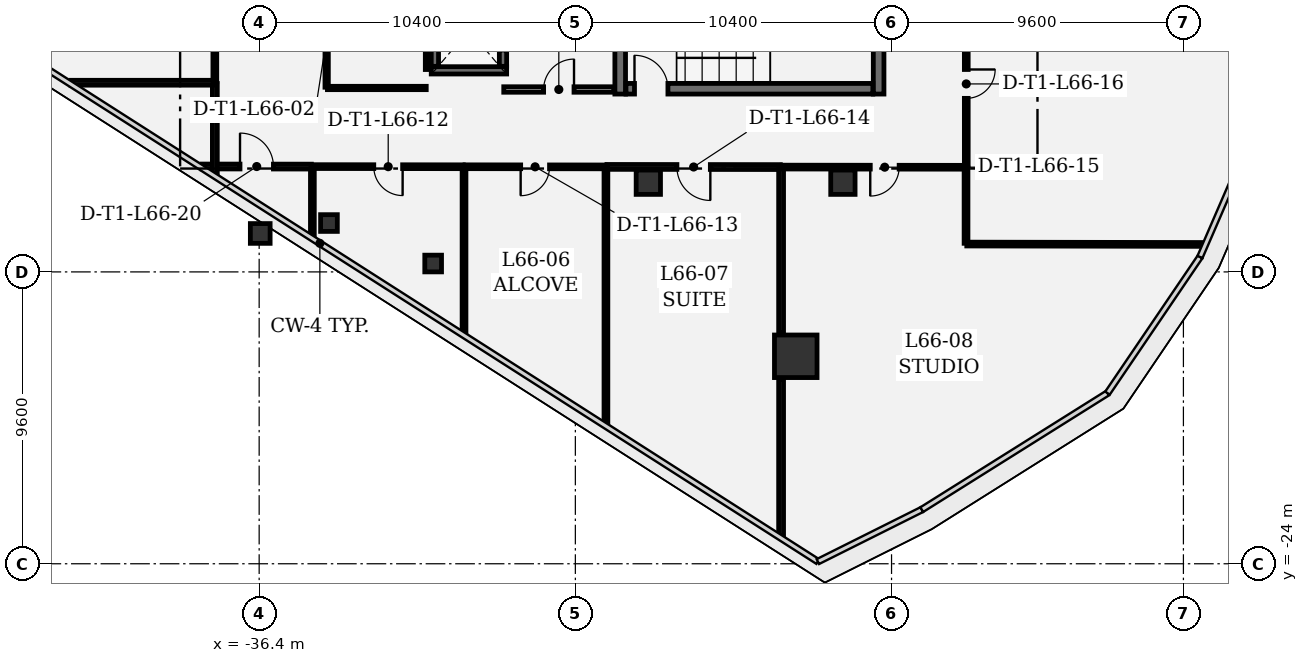
"""IFC4 building model, lengths in metres.
Left out: names, types, materials, properties, quantities, classifications, styles, units other than length and angle.
Written with IfcOpenShell. Run it as: python <this file> out.ifc"""

import sys

from ifc_helpers import new_model, si_unit, direction, frame, frame_2d, origin, origin_2d, place, context, subcontext, project, spatial, rectangle, extrude, element, fill, save


model = new_model("IFC4")
c1 = context("Model", 3, precision=1e-05, world=origin(), true_north=direction((0.0, 1.0)))
c2 = subcontext(c1, "Body", "Model", "MODEL_VIEW")
j1 = project(units=[si_unit("LENGTHUNIT", "METRE"), si_unit("PLANEANGLEUNIT", "RADIAN")], contexts=[c1])
p1 = place(None, origin())
s1 = spatial("IfcSite", under=j1, at=p1, CompositionType="ELEMENT")
p2 = place(p1, origin())
s2 = spatial("IfcBuilding", under=s1, at=p2, CompositionType="ELEMENT")
p3 = place(p2, frame((0.0, 0.0, 285.0)))
s3 = spatial("IfcBuildingStorey", under=s2, at=p3, CompositionType="ELEMENT", Elevation=285.0)
p4 = place(p3, frame((-18.75, -17.176, 0.0), z_axis=(0.0, 0.0, 1.0), x_axis=(1.0, 0.0, 0.0)))
e1 = element("IfcColumn", 1, at=p4, inside=s3, PredefinedType="COLUMN", context=c2, shape_type="SweptSolid", body=[
    extrude(rectangle(XDim=1.4, YDim=1.4, at=origin_2d()), origin(), (0.0, 0.0, 1.0), 4.2),
])
for number, where, z_axis, x_axis in (
    (2, (-17.2, -11.45, 0.0), (0.0, 0.0, 1.0), (1.0, 0.0, 0.0)),
    (3, (-23.6, -11.45, 0.0), (0.0, 0.0, 1.0), (1.0, 0.0, 0.0)),
):
    element("IfcColumn", number, at=place(p3, frame(where, z_axis=z_axis, x_axis=x_axis)), inside=s3, PredefinedType="COLUMN", context=c2, shape_type="SweptSolid", body=[
        extrude(rectangle(XDim=0.8, YDim=0.8, at=origin_2d()), origin(), (0.0, 0.0, 1.0), 4.2),
    ])
p5 = place(p3, frame((-36.365, -13.135, 0.0), z_axis=(0.0, 0.0, 1.0), x_axis=(1.0, 0.0, 0.0)))
e4 = element("IfcColumn", 4, at=p5, inside=s3, PredefinedType="COLUMN", context=c2, shape_type="SweptSolid", body=[
    extrude(rectangle(XDim=0.65, YDim=0.65, at=origin_2d()), origin(), (0.0, 0.0, 1.0), 4.2),
])
for number, where, z_axis, x_axis in (
    (5, (-34.104, -12.792, 0.0), (0.0, 0.0, 1.0), (1.0, 0.0, 0.0)),
    (6, (-30.677, -14.124, 0.0), (0.0, 0.0, 1.0), (1.0, 0.0, 0.0)),
):
    element("IfcColumn", number, at=place(p3, frame(where, z_axis=z_axis, x_axis=x_axis)), inside=s3, PredefinedType="COLUMN", context=c2, shape_type="SweptSolid", body=[
        extrude(rectangle(XDim=0.55, YDim=0.55, at=origin_2d()), origin(), (0.0, 0.0, 1.0), 4.2),
    ])
for number, where, z_axis, x_axis in (
    (7, (-24.525, -4.34, 0.0), (0.0, 0.0, 1.0), (0.0, -1.0, 0.0)),
    (8, (-16.025, -8.55, 0.0), (0.0, 0.0, 1.0), (0.0, 1.0, 0.0)),
):
    element("IfcWall", number, at=place(p3, frame(where, z_axis=z_axis, x_axis=x_axis)), inside=s3, PredefinedType="SHEAR", context=c2, shape_type="SweptSolid", body=[
        extrude(rectangle(XDim=4.21, YDim=0.35, at=frame_2d((2.105, 0.0))), origin(), (0.0, 0.0, 1.0), 3.91),
    ])
p6 = place(p3, frame((-24.335, -8.375, 0.0), z_axis=(0.0, 0.0, 1.0), x_axis=(1.0, 0.0, 0.0)))
e9 = element("IfcWall", 9, at=p6, inside=s3, PredefinedType="SHEAR", context=c2, shape_type="SweptSolid", body=[
    extrude(rectangle(XDim=8.12, YDim=0.35, at=frame_2d((4.06, 0.0))), origin(), (0.0, 0.0, 1.0), 3.91),
])
p7 = place(p6, frame((0.28, 0.0, 0.0)))
e10 = element("IfcOpeningElement", 10, at=p7, cuts=e9, PredefinedType="OPENING", context=c2, shape_type="SweptSolid", body=[
    extrude(rectangle(XDim=1.1, YDim=2.2, at=frame_2d((0.55, 1.1))), frame((0.0, 0.185, 0.0), z_axis=(0.0, -1.0, 0.0), x_axis=(1.0, 0.0, 0.0)), (0.0, 0.0, 1.0), 0.37),
])
p8 = place(p3, frame((-28.26, -7.77, 0.0), z_axis=(0.0, 0.0, 1.0), x_axis=(-1.0, 0.0, 0.0)))
e11 = element("IfcWall", 11, at=p8, inside=s3, PredefinedType="SHEAR", context=c2, shape_type="SweptSolid", body=[
    extrude(rectangle(XDim=2.48, YDim=0.24, at=frame_2d((1.24, 0.0))), origin(), (0.0, 0.0, 1.0), 3.91),
])
p9 = place(p3, frame((-30.62, -7.638, 0.0), z_axis=(0.0, 0.0, 1.0), x_axis=(0.0, 1.0, 0.0)))
e12 = element("IfcWall", 12, at=p9, inside=s3, PredefinedType="SHEAR", context=c2, shape_type="SweptSolid", body=[
    extrude(rectangle(XDim=2.376, YDim=0.24, at=frame_2d((1.188, 0.0))), origin(), (0.0, 0.0, 1.0), 3.91),
])
p10 = place(p3, frame((-28.38, -5.262, 0.0), z_axis=(0.0, 0.0, 1.0), x_axis=(0.0, -1.0, 0.0)))
e13 = element("IfcWall", 13, at=p10, inside=s3, PredefinedType="SHEAR", context=c2, shape_type="SweptSolid", body=[
    extrude(rectangle(XDim=2.376, YDim=0.24, at=frame_2d((1.188, 0.0))), origin(), (0.0, 0.0, 1.0), 3.91),
])
p11 = place(p10, frame((0.538, 0.0, 0.0)))
e14 = element("IfcOpeningElement", 14, at=p11, cuts=e13, PredefinedType="OPENING", context=c2, shape_type="SweptSolid", body=[
    extrude(rectangle(XDim=1.3, YDim=2.3, at=frame_2d((0.65, 1.15))), frame((0.0, 0.13, 0.0), z_axis=(0.0, -1.0, 0.0), x_axis=(1.0, 0.0, 0.0)), (0.0, 0.0, 1.0), 0.26),
])
p12 = place(p3, frame((-28.355, -8.4, 0.0), z_axis=(0.0, 0.0, 1.0), x_axis=(1.0, 0.0, 0.0)))
e15 = element("IfcWall", 15, at=p12, inside=s3, PredefinedType="PARTITIONING", context=c2, shape_type="SweptSolid", body=[
    extrude(rectangle(XDim=3.622, YDim=0.18, at=frame_2d((1.811, 0.0))), origin(), (0.0, 0.0, 1.0), 3.529),
])
p13 = place(p12, frame((1.311, 0.0, 0.0)))
e16 = element("IfcOpeningElement", 16, at=p13, cuts=e15, PredefinedType="OPENING", context=c2, shape_type="SweptSolid", body=[
    extrude(rectangle(XDim=1.0, YDim=2.15, at=frame_2d((0.5, 1.075))), frame((0.0, 0.1, 0.0), z_axis=(0.0, -1.0, 0.0), x_axis=(1.0, 0.0, 0.0)), (0.0, 0.0, 1.0), 0.2),
])
p14 = place(p3, frame((-34.155, -8.35, 0.0), z_axis=(0.0, 0.0, 1.0), x_axis=(1.0, 0.0, 0.0)))
e17 = element("IfcWall", 17, at=p14, inside=s3, PredefinedType="PARTITIONING", context=c2, shape_type="SweptSolid", body=[
    extrude(rectangle(XDim=3.25, YDim=0.11, at=frame_2d((1.625, 0.0))), origin(), (0.0, 0.0, 1.0), 3.13),
])
p15 = place(p3, frame((-30.88, -7.743, 0.0), z_axis=(0.0, 0.0, 1.0), x_axis=(0.0, 1.0, 0.0)))
e18 = element("IfcWall", 18, at=p15, inside=s3, PredefinedType="PARTITIONING", context=c2, shape_type="SweptSolid", body=[
    extrude(rectangle(XDim=2.128, YDim=0.11, at=frame_2d((1.064, 0.0))), origin(), (0.0, 0.0, 1.0), 3.91),
])
p16 = place(p3, frame((-34.18, -5.075, 0.0), z_axis=(0.0, 0.0, 1.0), x_axis=(0.0, -1.0, 0.0)))
e19 = element("IfcWall", 19, at=p16, inside=s3, PredefinedType="PARTITIONING", context=c2, shape_type="SweptSolid", body=[
    extrude(rectangle(XDim=3.25, YDim=0.11, at=frame_2d((1.625, 0.0))), origin(), (0.0, 0.0, 1.0), 3.91),
])
p17 = place(p16, frame((1.185, 0.0, 0.0)))
e20 = element("IfcOpeningElement", 20, at=p17, cuts=e19, PredefinedType="OPENING", context=c2, shape_type="SweptSolid", body=[
    extrude(rectangle(XDim=0.88, YDim=2.1, at=frame_2d((0.44, 1.05))), frame((0.0, 0.065, 0.0), z_axis=(0.0, -1.0, 0.0), x_axis=(1.0, 0.0, 0.0)), (0.0, 0.0, 1.0), 0.13),
])
p18 = place(p3, frame((-29.687, -10.941, 0.0), z_axis=(0.0, 0.0, 1.0), x_axis=(-0.999999461107, 0.00103816436, 0.0)))
e21 = element("IfcWall", 21, at=p18, inside=s3, PredefinedType="PARTITIONING", context=c2, shape_type="SweptSolid", body=[
    extrude(rectangle(XDim=4.938, YDim=0.125, at=frame_2d((2.469, 0.0))), origin(), (0.0, 0.0, 1.0), 3.13),
])
p19 = place(p18, frame((1.994, 0.0, 0.0)))
e22 = element("IfcOpeningElement", 22, at=p19, cuts=e21, PredefinedType="OPENING", context=c2, shape_type="SweptSolid", body=[
    extrude(rectangle(XDim=0.95, YDim=2.15, at=frame_2d((0.475, 1.075))), frame((0.0, 0.073, 0.0), z_axis=(0.0, -1.0, 0.0), x_axis=(1.0, 0.0, 0.0)), (0.0, 0.0, 1.0), 0.145),
])
p20 = place(p3, frame((-34.65, -10.961, 0.0), z_axis=(0.0, 0.0, 1.0), x_axis=(0.0, -1.0, 0.0)))
e23 = element("IfcWall", 23, at=p20, inside=s3, PredefinedType="PARTITIONING", context=c2, shape_type="SweptSolid", body=[
    extrude(rectangle(XDim=2.261, YDim=0.125, at=frame_2d((1.131, 0.0))), origin(), (0.0, 0.0, 1.0), 3.91),
])
p21 = place(p3, frame((-29.662, -16.411, 0.0), z_axis=(0.0, 0.0, 1.0), x_axis=(0.0, 1.0, 0.0)))
e24 = element("IfcWall", 24, at=p21, inside=s3, PredefinedType="PARTITIONING", context=c2, shape_type="SweptSolid", body=[
    extrude(rectangle(XDim=5.444, YDim=0.125, at=frame_2d((2.722, 0.0))), origin(), (0.0, 0.0, 1.0), 3.91),
])
p22 = place(p3, frame((-25.019, -10.946, 0.0), z_axis=(0.0, 0.0, 1.0), x_axis=(-0.999999438978, 0.001059265334, 0.0)))
e25 = element("IfcWall", 25, at=p22, inside=s3, PredefinedType="PARTITIONING", context=c2, shape_type="SweptSolid", body=[
    extrude(rectangle(XDim=4.61, YDim=0.125, at=frame_2d((2.305, 0.0))), origin(), (0.0, 0.0, 1.0), 3.13),
])
p23 = place(p22, frame((1.83, 0.0, 0.0)))
e26 = element("IfcOpeningElement", 26, at=p23, cuts=e25, PredefinedType="OPENING", context=c2, shape_type="SweptSolid", body=[
    extrude(rectangle(XDim=0.95, YDim=2.15, at=frame_2d((0.475, 1.075))), frame((0.0, 0.073, 0.0), z_axis=(0.0, -1.0, 0.0), x_axis=(1.0, 0.0, 0.0)), (0.0, 0.0, 1.0), 0.145),
])
p24 = place(p3, frame((-24.994, -19.394, 0.0), z_axis=(0.0, 0.0, 1.0), x_axis=(0.0, 1.0, 0.0)))
e27 = element("IfcWall", 27, at=p24, inside=s3, PredefinedType="PARTITIONING", context=c2, shape_type="SweptSolid", body=[
    extrude(rectangle(XDim=8.423, YDim=0.125, at=frame_2d((4.211, 0.0))), origin(), (0.0, 0.0, 1.0), 3.529),
])
p25 = place(p3, frame((-19.258, -10.952, 0.0), z_axis=(0.0, 0.0, 1.0), x_axis=(-0.999999472273, 0.001027352739, 0.0)))
e28 = element("IfcWall", 28, at=p25, inside=s3, PredefinedType="PARTITIONING", context=c2, shape_type="SweptSolid", body=[
    extrude(rectangle(XDim=5.703, YDim=0.16, at=frame_2d((2.852, 0.0))), origin(), (0.0, 0.0, 1.0), 3.91),
])
p26 = place(p25, frame((2.302, 0.0, 0.0)))
e29 = element("IfcOpeningElement", 29, at=p26, cuts=e28, PredefinedType="OPENING", context=c2, shape_type="SweptSolid", body=[
    extrude(rectangle(XDim=1.1, YDim=2.15, at=frame_2d((0.55, 1.075))), frame((0.0, 0.09, 0.0), z_axis=(0.0, -1.0, 0.0), x_axis=(1.0, 0.0, 0.0)), (0.0, 0.0, 1.0), 0.18),
])
p27 = place(p3, frame((-19.233, -23.076, 0.0), z_axis=(0.0, 0.0, 1.0), x_axis=(0.0, 1.0, 0.0)))
e30 = element("IfcWall", 30, at=p27, inside=s3, PredefinedType="PARTITIONING", context=c2, shape_type="SweptSolid", body=[
    extrude(rectangle(XDim=5.135, YDim=0.16, at=frame_2d((2.568, 0.0))), origin(), (0.0, 0.0, 1.0), 3.91),
])
p28 = place(p3, frame((-19.233, -16.411, 0.0), z_axis=(0.0, 0.0, 1.0), x_axis=(0.0, 1.0, 0.0)))
e31 = element("IfcWall", 31, at=p28, inside=s3, PredefinedType="PARTITIONING", context=c2, shape_type="SweptSolid", body=[
    extrude(rectangle(XDim=5.434, YDim=0.16, at=frame_2d((2.717, 0.0))), origin(), (0.0, 0.0, 1.0), 3.91),
])
p29 = place(p3, frame((-5.356, -13.497, 0.0), z_axis=(0.0, 0.0, 1.0), x_axis=(-0.999998664878, 0.001634087442, 0.0)))
e32 = element("IfcWall", 32, at=p29, inside=s3, PredefinedType="PARTITIONING", context=c2, shape_type="SweptSolid", body=[
    extrude(rectangle(XDim=7.769, YDim=0.125, at=frame_2d((3.885, 0.0))), origin(), (0.0, 0.0, 1.0), 3.91),
])
p30 = place(p3, frame((-13.15, -13.459, 0.0), z_axis=(0.0, 0.0, 1.0), x_axis=(0.0, 1.0, 0.0)))
e33 = element("IfcWall", 33, at=p30, inside=s3, PredefinedType="PARTITIONING", context=c2, shape_type="SweptSolid", body=[
    extrude(rectangle(XDim=2.476, YDim=0.125, at=frame_2d((1.238, 0.0))), origin(), (0.0, 0.0, 1.0), 3.91),
])
p31 = place(p3, frame((-13.175, -10.958, 0.0), z_axis=(0.0, 0.0, 1.0), x_axis=(-0.999999486867, 0.001013047539, 0.0)))
e34 = element("IfcWall", 34, at=p31, inside=s3, PredefinedType="PARTITIONING", context=c2, shape_type="SweptSolid", body=[
    extrude(rectangle(XDim=6.025, YDim=0.125, at=frame_2d((3.012, 0.0))), origin(), (0.0, 0.0, 1.0), 3.529),
])
p32 = place(p31, frame((2.175, 0.0, 0.0)))
e35 = element("IfcOpeningElement", 35, at=p32, cuts=e34, PredefinedType="OPENING", context=c2, shape_type="SweptSolid", body=[
    extrude(rectangle(XDim=0.95, YDim=2.15, at=frame_2d((0.475, 1.075))), frame((0.0, 0.073, 0.0), z_axis=(0.0, -1.0, 0.0), x_axis=(1.0, 0.0, 0.0)), (0.0, 0.0, 1.0), 0.145),
])
p33 = place(p3, frame((-13.142, -5.475, 0.0), z_axis=(0.0, 0.0, 1.0), x_axis=(0.0, -1.0, 0.0)))
e36 = element("IfcWall", 36, at=p33, inside=s3, PredefinedType="PARTITIONING", context=c2, shape_type="SweptSolid", body=[
    extrude(rectangle(XDim=5.483, YDim=0.125, at=frame_2d((2.741, 0.0))), origin(), (0.0, 0.0, 1.0), 3.13),
])
p34 = place(p33, frame((2.266, 0.0, 0.0)))
e37 = element("IfcOpeningElement", 37, at=p34, cuts=e36, PredefinedType="OPENING", context=c2, shape_type="SweptSolid", body=[
    extrude(rectangle(XDim=0.95, YDim=2.15, at=frame_2d((0.475, 1.075))), frame((0.0, 0.073, 0.0), z_axis=(0.0, -1.0, 0.0), x_axis=(1.0, 0.0, 0.0)), (0.0, 0.0, 1.0), 0.145),
])
p35 = place(p3, frame((-38.278, -10.932, 0.0), z_axis=(0.0, 0.0, 1.0), x_axis=(0.99999948115, -0.001018675193, 0.0)))
e38 = element("IfcWall", 38, at=p35, inside=s3, PredefinedType="PARTITIONING", context=c2, shape_type="SweptSolid", body=[
    extrude(rectangle(XDim=3.595, YDim=0.16, at=frame_2d((1.797, 0.0))), origin(), (0.0, 0.0, 1.0), 3.91),
])
p36 = place(p35, frame((1.248, 0.0, 0.0)))
e39 = element("IfcOpeningElement", 39, at=p36, cuts=e38, PredefinedType="OPENING", context=c2, shape_type="SweptSolid", body=[
    extrude(rectangle(XDim=1.1, YDim=2.15, at=frame_2d((0.55, 1.075))), frame((0.0, 0.09, 0.0), z_axis=(0.0, -1.0, 0.0), x_axis=(1.0, 0.0, 0.0)), (0.0, 0.0, 1.0), 0.18),
])
p37 = place(p3, frame((-37.858, -11.172, 0.0), z_axis=(0.0, 0.0, 1.0), x_axis=(0.0, 1.0, 0.0)))
e40 = element("IfcWall", 40, at=p37, inside=s3, PredefinedType="PARTITIONING", context=c2, shape_type="SweptSolid", body=[
    extrude(rectangle(XDim=2.97, YDim=0.16, at=frame_2d((1.485, 0.0))), origin(), (0.0, 0.0, 1.0), 3.91),
])
p38 = place(p3, frame((-37.883, -8.177, 0.0), z_axis=(0.0, 0.0, 1.0), x_axis=(-1.0, 0.0, 0.0)))
e41 = element("IfcWall", 41, at=p38, inside=s3, PredefinedType="PARTITIONING", context=c2, shape_type="SweptSolid", body=[
    extrude(rectangle(XDim=4.706, YDim=0.16, at=frame_2d((2.353, 0.0))), origin(), (0.0, 0.0, 1.0), 3.91),
])
p39 = place(p3, frame((-37.858, -8.144, 0.0), z_axis=(0.0, 0.0, 1.0), x_axis=(0.0, 1.0, 0.0)))
e42 = element("IfcWall", 42, at=p39, inside=s3, PredefinedType="PARTITIONING", context=c2, shape_type="SweptSolid", body=[
    extrude(rectangle(XDim=3.361, YDim=0.125, at=frame_2d((1.681, 0.0))), origin(), (0.0, 0.0, 1.0), 3.91),
])
p40 = place(p39, frame((1.206, 0.0, 0.0)))
e43 = element("IfcOpeningElement", 43, at=p40, cuts=e42, PredefinedType="OPENING", context=c2, shape_type="SweptSolid", body=[
    extrude(rectangle(XDim=0.95, YDim=2.15, at=frame_2d((0.475, 1.075))), frame((0.0, 0.073, 0.0), z_axis=(0.0, -1.0, 0.0), x_axis=(1.0, 0.0, 0.0)), (0.0, 0.0, 1.0), 0.145),
])
p41 = place(p7, origin())
e44 = element("IfcDoor", 44, at=p41, inside=s3, OperationType="SINGLE_SWING_LEFT", PredefinedType="DOOR", context=c2, shape_type="SweptSolid", body=[
    extrude(rectangle(XDim=1.1, YDim=2.2, at=frame_2d((0.55, 1.1))), frame((0.0, 0.025, 0.0), z_axis=(0.0, -1.0, 0.0), x_axis=(1.0, 0.0, 0.0)), (0.0, 0.0, 1.0), 0.05),
])
fill(e10, e44)
p42 = place(p19, origin())
e45 = element("IfcDoor", 45, at=p42, inside=s3, OperationType="SINGLE_SWING_LEFT", PredefinedType="DOOR", context=c2, shape_type="SweptSolid", body=[
    extrude(rectangle(XDim=0.95, YDim=2.15, at=frame_2d((0.475, 1.075))), frame((0.0, 0.025, 0.0), z_axis=(0.0, -1.0, 0.0), x_axis=(1.0, 0.0, 0.0)), (0.0, 0.0, 1.0), 0.05),
])
fill(e22, e45)
p43 = place(p23, origin())
e46 = element("IfcDoor", 46, at=p43, inside=s3, OperationType="SINGLE_SWING_RIGHT", PredefinedType="DOOR", context=c2, shape_type="SweptSolid", body=[
    extrude(rectangle(XDim=0.95, YDim=2.15, at=frame_2d((0.475, 1.075))), frame((0.0, 0.025, 0.0), z_axis=(0.0, -1.0, 0.0), x_axis=(1.0, 0.0, 0.0)), (0.0, 0.0, 1.0), 0.05),
])
fill(e26, e46)
p44 = place(p26, origin())
e47 = element("IfcDoor", 47, at=p44, inside=s3, OperationType="SINGLE_SWING_LEFT", PredefinedType="DOOR", context=c2, shape_type="SweptSolid", body=[
    extrude(rectangle(XDim=1.1, YDim=2.15, at=frame_2d((0.55, 1.075))), frame((0.0, 0.025, 0.0), z_axis=(0.0, -1.0, 0.0), x_axis=(1.0, 0.0, 0.0)), (0.0, 0.0, 1.0), 0.05),
])
fill(e29, e47)
p45 = place(p32, origin())
e48 = element("IfcDoor", 48, at=p45, inside=s3, OperationType="SINGLE_SWING_RIGHT", PredefinedType="DOOR", context=c2, shape_type="SweptSolid", body=[
    extrude(rectangle(XDim=0.95, YDim=2.15, at=frame_2d((0.475, 1.075))), frame((0.0, 0.025, 0.0), z_axis=(0.0, -1.0, 0.0), x_axis=(1.0, 0.0, 0.0)), (0.0, 0.0, 1.0), 0.05),
])
fill(e35, e48)
p46 = place(p34, origin())
e49 = element("IfcDoor", 49, at=p46, inside=s3, OperationType="SINGLE_SWING_LEFT", PredefinedType="DOOR", context=c2, shape_type="SweptSolid", body=[
    extrude(rectangle(XDim=0.95, YDim=2.15, at=frame_2d((0.475, 1.075))), frame((0.0, 0.025, 0.0), z_axis=(0.0, -1.0, 0.0), x_axis=(1.0, 0.0, 0.0)), (0.0, 0.0, 1.0), 0.05),
])
fill(e37, e49)
p47 = place(p36, origin())
e50 = element("IfcDoor", 50, at=p47, inside=s3, OperationType="SINGLE_SWING_LEFT", PredefinedType="DOOR", context=c2, shape_type="SweptSolid", body=[
    extrude(rectangle(XDim=1.1, YDim=2.15, at=frame_2d((0.55, 1.075))), frame((0.0, 0.025, 0.0), z_axis=(0.0, -1.0, 0.0), x_axis=(1.0, 0.0, 0.0)), (0.0, 0.0, 1.0), 0.05),
])
fill(e39, e50)
p48 = place(p13, origin())
e51 = element("IfcDoor", 51, at=p48, inside=s3, OperationType="SINGLE_SWING_RIGHT", PredefinedType="DOOR", context=c2, shape_type="SweptSolid", body=[
    extrude(rectangle(XDim=1.0, YDim=2.15, at=frame_2d((0.5, 1.075))), frame((0.0, 0.025, 0.0), z_axis=(0.0, -1.0, 0.0), x_axis=(1.0, 0.0, 0.0)), (0.0, 0.0, 1.0), 0.05),
])
fill(e16, e51)
save(model, sys.argv[1])
